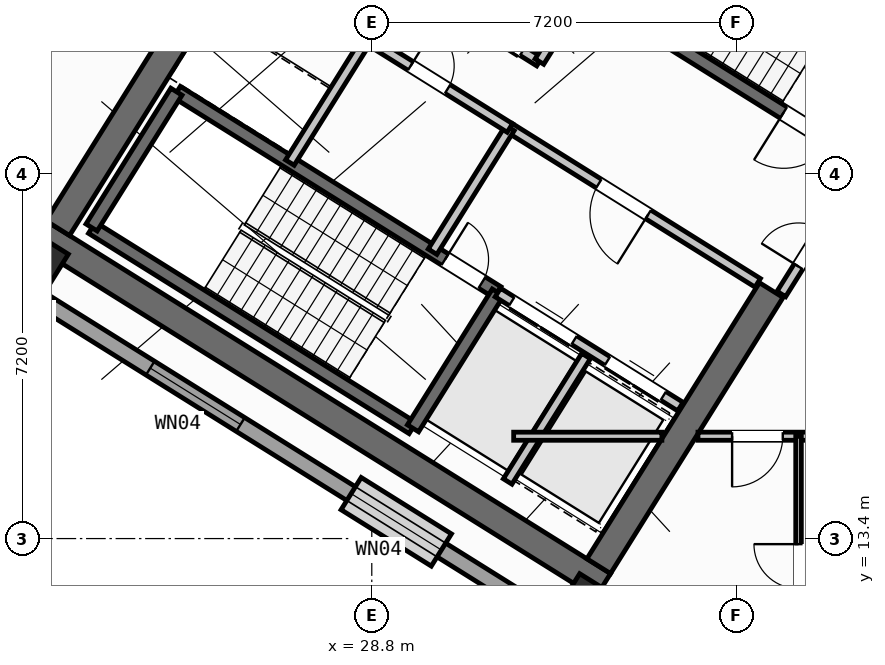
"""IFC4 building model, lengths in metres.
Left out: names, types, materials, properties, quantities, classifications, styles, units other than length and angle.
Written with IfcOpenShell. Run it as: python <this file> out.ifc"""

import sys

from ifc_helpers import new_model, si_unit, direction, frame, frame_2d, origin, origin_2d, place, context, subcontext, project, spatial, rectangle, hollow_rectangle, extrude, source, transform, mapped, element, fill, save


model = new_model("IFC4")
c1 = context("Model", 3, precision=1e-05, world=origin(), true_north=direction((0.0, 1.0)))
c2 = subcontext(c1, "Body", "Model", "MODEL_VIEW")
j1 = project(units=[si_unit("LENGTHUNIT", "METRE"), si_unit("PLANEANGLEUNIT", "RADIAN")], contexts=[c1])
p1 = place(None, origin())
s1 = spatial("IfcSite", under=j1, at=p1, CompositionType="ELEMENT")
p2 = place(p1, origin())
s2 = spatial("IfcBuilding", under=s1, at=p2, CompositionType="ELEMENT")
p3 = place(p2, frame((0.0, 0.0, 123.3)))
s3 = spatial("IfcBuildingStorey", under=s2, at=p3, CompositionType="ELEMENT", Elevation=123.3)
p4 = place(p3, frame((33.366, 12.477, 0.0), z_axis=(0.0, 0.0, 1.0), x_axis=(-0.848047359947, 0.529920442413, 0.0)))
e1 = element("IfcWall", 1, at=p4, inside=s3, PredefinedType="SHEAR", context=c2, shape_type="SweptSolid", body=[
    extrude(rectangle(XDim=13.14, YDim=0.55, at=frame_2d((6.57, 0.0))), origin(), (0.0, 0.0, 1.0), 4.22),
])
p5 = place(p3, frame((36.683, 18.304, 0.0), z_axis=(0.0, 0.0, 1.0), x_axis=(-0.529896466841, -0.848062341122, 0.0)))
e2 = element("IfcWall", 2, at=p5, inside=s3, PredefinedType="SHEAR", context=c2, shape_type="SweptSolid", body=[
    extrude(rectangle(XDim=6.425, YDim=0.55, at=frame_2d((3.212, 0.0))), origin(), (0.0, 0.0, 1.0), 4.22),
])
p6 = place(p3, frame((26.007, 24.976, 0.0), z_axis=(0.0, 0.0, 1.0), x_axis=(-0.529923795287, -0.848045264823, 0.0)))
e3 = element("IfcWall", 3, at=p6, inside=s3, PredefinedType="SHEAR", context=c2, shape_type="SweptSolid", body=[
    extrude(rectangle(XDim=6.425, YDim=0.55, at=frame_2d((3.212, 0.0))), origin(), (0.0, 0.0, 1.0), 4.22),
])
m1 = source(origin(), c2, "Body", "SweptSolid", [
    extrude(hollow_rectangle(XDim=0.9, YDim=0.9, WallThickness=0.036, at=origin_2d()), origin(), (0.0, 0.0, 1.0), 4.5),
])
for number, where, z_axis, x_axis in (
    (4, (33.046, 12.087, 0.0), (0.0, 0.0, 1.0), (-0.848, 0.53, 0.0)),
    (5, (22.191, 18.87, 0.0), (0.0, 0.0, 1.0), (-0.848, 0.53, 0.0)),
):
    element("IfcColumn", number, at=place(p3, frame(where, z_axis=z_axis, x_axis=x_axis)), inside=s3, PredefinedType="COLUMN", context=c2, shape_type="MappedRepresentation", body=[
        mapped(m1, transform((0.0, 0.0, 0.0), scale=1.0)),
    ])
p7 = place(p3, frame((31.76, 12.183, 0.0), z_axis=(0.0, 0.0, 1.0), x_axis=(-0.848047074256, 0.529920899612, 0.0)))
e6 = element("IfcWall", 6, at=p7, inside=s3, PredefinedType="STANDARD", context=c2, shape_type="SweptSolid", body=[
    extrude(rectangle(XDim=30.652, YDim=0.32, at=frame_2d((15.326, 0.0))), origin(), (0.0, 0.0, 1.0), 4.22),
])
p8 = place(p7, frame((14.966, 0.0, 0.0)))
e7 = element("IfcOpeningElement", 7, at=p8, cuts=e6, PredefinedType="OPENING", context=c2, shape_type="SweptSolid", body=[
    extrude(rectangle(XDim=1.2, YDim=2.15, at=frame_2d((0.6, 1.075))), frame((0.0, 0.17, 0.0), z_axis=(0.0, -1.0, 0.0), x_axis=(1.0, 0.0, 0.0)), (0.0, 0.0, 1.0), 0.34),
])
p9 = place(p7, frame((1.871, 0.0, 0.8)))
e8 = element("IfcOpeningElement", 8, at=p9, cuts=e6, PredefinedType="OPENING", context=c2, shape_type="SweptSolid", body=[
    extrude(rectangle(XDim=2.1, YDim=1.55, at=frame_2d((1.05, 0.775))), frame((0.0, 0.17, 0.0), z_axis=(0.0, -1.0, 0.0), x_axis=(1.0, 0.0, 0.0)), (0.0, 0.0, 1.0), 0.34),
])
p10 = place(p7, frame((6.546, 0.0, 0.8)))
e9 = element("IfcOpeningElement", 9, at=p10, cuts=e6, PredefinedType="OPENING", context=c2, shape_type="SweptSolid", body=[
    extrude(rectangle(XDim=2.1, YDim=1.55, at=frame_2d((1.05, 0.775))), frame((0.0, 0.17, 0.0), z_axis=(0.0, -1.0, 0.0), x_axis=(1.0, 0.0, 0.0)), (0.0, 0.0, 1.0), 0.34),
])
p11 = place(p7, frame((20.508, 0.0, 0.85)))
e10 = element("IfcOpeningElement", 10, at=p11, cuts=e6, PredefinedType="OPENING", context=c2, shape_type="SweptSolid", body=[
    extrude(rectangle(XDim=1.5, YDim=1.5, at=frame_2d((0.75, 0.75))), frame((0.0, 0.17, 0.0), z_axis=(0.0, -1.0, 0.0), x_axis=(1.0, 0.0, 0.0)), (0.0, 0.0, 1.0), 0.34),
])
p12 = place(p7, frame((27.253, 0.0, 0.95)))
e11 = element("IfcOpeningElement", 11, at=p12, cuts=e6, PredefinedType="OPENING", context=c2, shape_type="SweptSolid", body=[
    extrude(rectangle(XDim=1.2, YDim=1.4, at=frame_2d((0.6, 0.7))), frame((0.0, 0.17, 0.0), z_axis=(0.0, -1.0, 0.0), x_axis=(1.0, 0.0, 0.0)), (0.0, 0.0, 1.0), 0.34),
])
p13 = place(p3, frame((29.605, 15.581, 0.0), z_axis=(0.0, 0.0, 1.0), x_axis=(-0.848036911448, 0.529937163087, 0.0)))
e12 = element("IfcWall", 12, at=p13, inside=s3, PredefinedType="SHEAR", context=c2, shape_type="SweptSolid", body=[
    extrude(rectangle(XDim=7.46, YDim=0.26, at=frame_2d((3.73, 0.0))), origin(), (0.0, 0.0, 1.0), 4.22),
])
p14 = place(p3, frame((31.28, 18.261, 0.0), z_axis=(0.0, 0.0, 1.0), x_axis=(-0.848051618787, 0.529913626805, 0.0)))
e13 = element("IfcWall", 13, at=p14, inside=s3, PredefinedType="SHEAR", context=c2, shape_type="SweptSolid", body=[
    extrude(rectangle(XDim=7.46, YDim=0.26, at=frame_2d((3.73, 0.0))), origin(), (0.0, 0.0, 1.0), 4.22),
])
p15 = place(p14, frame((0.36, 0.0, 0.0)))
e14 = element("IfcOpeningElement", 14, at=p15, cuts=e13, PredefinedType="OPENING", context=c2, shape_type="SweptSolid", body=[
    extrude(rectangle(XDim=0.86, YDim=2.05, at=frame_2d((0.43, 1.025))), frame((0.0, 0.14, 0.0), z_axis=(0.0, -1.0, 0.0), x_axis=(1.0, 0.0, 0.0)), (0.0, 0.0, 1.0), 0.28),
])
p16 = place(p3, frame((31.288, 18.256, 0.0), z_axis=(0.0, 0.0, 1.0), x_axis=(-0.529943379326, -0.848033026897, 0.0)))
e15 = element("IfcWall", 15, at=p16, inside=s3, PredefinedType="SHEAR", context=c2, shape_type="SweptSolid", body=[
    extrude(rectangle(XDim=3.16, YDim=0.26, at=frame_2d((1.58, 0.0))), origin(), (0.0, 0.0, 1.0), 4.22),
])
p17 = place(p3, frame((24.945, 22.22, 0.0), z_axis=(0.0, 0.0, 1.0), x_axis=(-0.529908658664, -0.84805472316, 0.0)))
e16 = element("IfcWall", 16, at=p17, inside=s3, PredefinedType="SHEAR", context=c2, shape_type="SweptSolid", body=[
    extrude(rectangle(XDim=3.16, YDim=0.26, at=frame_2d((1.58, 0.0))), origin(), (0.0, 0.0, 1.0), 4.22),
])
p18 = place(p3, frame((38.046, 21.108, 0.0), z_axis=(0.0, 0.0, 1.0), x_axis=(-0.848054434086, 0.529909121291, 0.0)))
e17 = element("IfcWall", 17, at=p18, inside=s3, PredefinedType="SHEAR", context=c2, shape_type="SweptSolid", body=[
    extrude(rectangle(XDim=7.33, YDim=0.26, at=frame_2d((3.665, 0.0))), origin(), (0.0, 0.0, 1.0), 4.22),
])
p19 = place(p18, frame((0.22, 0.0, 0.0)))
e18 = element("IfcOpeningElement", 18, at=p19, cuts=e17, PredefinedType="OPENING", context=c2, shape_type="SweptSolid", body=[
    extrude(rectangle(XDim=1.1, YDim=2.1, at=frame_2d((0.55, 1.05))), frame((0.0, 0.14, 0.0), z_axis=(0.0, -1.0, 0.0), x_axis=(1.0, 0.0, 0.0)), (0.0, 0.0, 1.0), 0.28),
])
p20 = place(p3, frame((34.891, 16.005, 0.0), z_axis=(0.0, 0.0, 1.0), x_axis=(-0.848062873452, 0.529895614884, 0.0)))
e19 = element("IfcWall", 19, at=p20, inside=s3, PredefinedType="STANDARD", context=c2, shape_type="SweptSolid", body=[
    extrude(rectangle(XDim=4.248, YDim=0.2, at=frame_2d((2.124, 0.0))), origin(), (0.0, 0.0, 1.0), 4.21),
])
p21 = place(p20, frame((0.398, 0.0, 0.0)))
e20 = element("IfcOpeningElement", 20, at=p21, cuts=e19, PredefinedType="OPENING", context=c2, shape_type="SweptSolid", body=[
    extrude(rectangle(XDim=1.3, YDim=2.2, at=frame_2d((0.65, 1.1))), frame((0.0, 0.11, 0.0), z_axis=(0.0, -1.0, 0.0), x_axis=(1.0, 0.0, 0.0)), (0.0, 0.0, 1.0), 0.22),
])
p22 = place(p20, frame((2.473, 0.0, 0.0)))
e21 = element("IfcOpeningElement", 21, at=p22, cuts=e19, PredefinedType="OPENING", context=c2, shape_type="SweptSolid", body=[
    extrude(rectangle(XDim=1.45, YDim=2.25, at=frame_2d((0.725, 1.125))), frame((0.0, 0.11, 0.0), z_axis=(0.0, -1.0, 0.0), x_axis=(1.0, 0.0, 0.0)), (0.0, 0.0, 1.0), 0.22),
])
p23 = place(p3, frame((36.417, 18.447, 0.0), z_axis=(0.0, 0.0, 1.0), x_axis=(-0.848064879198, 0.529892404805, 0.0)))
e22 = element("IfcWall", 22, at=p23, inside=s3, PredefinedType="STANDARD", context=c2, shape_type="SweptSolid", body=[
    extrude(rectangle(XDim=5.768, YDim=0.2, at=frame_2d((2.884, 0.0))), origin(), (0.0, 0.0, 1.0), 4.21),
])
p24 = place(p23, frame((2.548, 0.0, 0.0)))
e23 = element("IfcOpeningElement", 23, at=p24, cuts=e22, PredefinedType="OPENING", context=c2, shape_type="SweptSolid", body=[
    extrude(rectangle(XDim=1.15, YDim=2.1, at=frame_2d((0.575, 1.05))), frame((0.0, 0.11, 0.0), z_axis=(0.0, -1.0, 0.0), x_axis=(1.0, 0.0, 0.0)), (0.0, 0.0, 1.0), 0.22),
])
p25 = place(p3, frame((32.108, 22.814, 0.0), z_axis=(0.0, 0.0, 1.0), x_axis=(-0.848042229521, 0.529928652696, 0.0)))
e24 = element("IfcWall", 24, at=p25, inside=s3, PredefinedType="STANDARD", context=c2, shape_type="SweptSolid", body=[
    extrude(rectangle(XDim=5.62, YDim=0.2, at=frame_2d((2.81, 0.0))), origin(), (0.0, 0.0, 1.0), 4.21),
])
p26 = place(p25, frame((0.39, 0.0, 0.0)))
e25 = element("IfcOpeningElement", 25, at=p26, cuts=e24, PredefinedType="OPENING", context=c2, shape_type="SweptSolid", body=[
    extrude(rectangle(XDim=1.1, YDim=2.15, at=frame_2d((0.55, 1.075))), frame((0.0, 0.11, 0.0), z_axis=(0.0, -1.0, 0.0), x_axis=(1.0, 0.0, 0.0)), (0.0, 0.0, 1.0), 0.22),
])
p27 = place(p25, frame((2.25, 0.0, 0.0)))
e26 = element("IfcOpeningElement", 26, at=p27, cuts=e24, PredefinedType="OPENING", context=c2, shape_type="SweptSolid", body=[
    extrude(rectangle(XDim=1.1, YDim=2.15, at=frame_2d((0.55, 1.075))), frame((0.0, 0.11, 0.0), z_axis=(0.0, -1.0, 0.0), x_axis=(1.0, 0.0, 0.0)), (0.0, 0.0, 1.0), 0.22),
])
p28 = place(p25, frame((4.11, 0.0, 0.0)))
e27 = element("IfcOpeningElement", 27, at=p28, cuts=e24, PredefinedType="OPENING", context=c2, shape_type="SweptSolid", body=[
    extrude(rectangle(XDim=1.1, YDim=2.15, at=frame_2d((0.55, 1.075))), frame((0.0, 0.11, 0.0), z_axis=(0.0, -1.0, 0.0), x_axis=(1.0, 0.0, 0.0)), (0.0, 0.0, 1.0), 0.22),
])
p29 = place(p3, frame((32.982, 24.213, 0.0), z_axis=(0.0, 0.0, 1.0), x_axis=(-0.529839334948, -0.84809803628, 0.0)))
e28 = element("IfcWall", 28, at=p29, inside=s3, PredefinedType="STANDARD", context=c2, shape_type="SweptSolid", body=[
    extrude(rectangle(XDim=1.65, YDim=0.2, at=frame_2d((0.825, 0.0))), origin(), (0.0, 0.0, 1.0), 4.21),
])
p30 = place(p3, frame((33.029, 17.003, 0.0), z_axis=(0.0, 0.0, 1.0), x_axis=(-0.529916267533, -0.848049968695, 0.0)))
e29 = element("IfcWall", 29, at=p30, inside=s3, PredefinedType="STANDARD", context=c2, shape_type="SweptSolid", body=[
    extrude(rectangle(XDim=2.92, YDim=0.2, at=frame_2d((1.46, 0.0))), origin(), (0.0, 0.0, 1.0), 4.21),
])
for number, where, z_axis, x_axis in (
    (30, (31.525, 21.504, 0.0), (0.0, 0.0, 1.0), (-0.53, -0.848, 0.0)),
    (31, (28.71, 23.263, 0.0), (0.0, 0.0, 1.0), (-0.53, -0.848, 0.0)),
):
    element("IfcWall", number, at=place(p3, frame(where, z_axis=z_axis, x_axis=x_axis)), inside=s3, PredefinedType="STANDARD", context=c2, shape_type="SweptSolid", body=[
        extrude(rectangle(XDim=2.88, YDim=0.2, at=frame_2d((1.44, 0.0))), origin(), (0.0, 0.0, 1.0), 4.21),
    ])
p31 = place(p3, frame((31.525, 21.504, 0.0), z_axis=(0.0, 0.0, 1.0), x_axis=(-0.848040211232, 0.529931882541, 0.0)))
e32 = element("IfcWall", 32, at=p31, inside=s3, PredefinedType="STANDARD", context=c2, shape_type="SweptSolid", body=[
    extrude(rectangle(XDim=6.218, YDim=0.2, at=frame_2d((3.109, 0.0))), origin(), (0.0, 0.0, 1.0), 4.21),
])
p32 = place(p31, frame((4.4, 0.0, 0.0)))
e33 = element("IfcOpeningElement", 33, at=p32, cuts=e32, PredefinedType="OPENING", context=c2, shape_type="SweptSolid", body=[
    extrude(rectangle(XDim=0.86, YDim=2.05, at=frame_2d((0.43, 1.025))), frame((0.0, 0.11, 0.0), z_axis=(0.0, -1.0, 0.0), x_axis=(1.0, 0.0, 0.0)), (0.0, 0.0, 1.0), 0.22),
])
p33 = place(p31, frame((1.45, 0.0, 0.0)))
e34 = element("IfcOpeningElement", 34, at=p33, cuts=e32, PredefinedType="OPENING", context=c2, shape_type="SweptSolid", body=[
    extrude(rectangle(XDim=0.86, YDim=2.05, at=frame_2d((0.43, 1.025))), frame((0.0, 0.11, 0.0), z_axis=(0.0, -1.0, 0.0), x_axis=(1.0, 0.0, 0.0)), (0.0, 0.0, 1.0), 0.22),
])
p34 = place(p3, frame((25.198, 28.606, 0.0), z_axis=(0.0, 0.0, 1.0), x_axis=(-0.529926497642, -0.848043576178, 0.0)))
e35 = element("IfcWall", 35, at=p34, inside=s3, PredefinedType="PARTITIONING", context=c2, shape_type="SweptSolid", body=[
    extrude(rectangle(XDim=10.3, YDim=0.16, at=frame_2d((5.15, 0.0))), origin(), (0.0, 0.0, 1.0), 4.21),
])
p35 = place(p3, frame((38.451, 20.737, 0.0), z_axis=(0.0, 0.0, 1.0), x_axis=(-0.529924799939, -0.848044637038, 0.0)))
e36 = element("IfcWall", 36, at=p35, inside=s3, PredefinedType="STANDARD", context=c2, shape_type="SweptSolid", body=[
    extrude(rectangle(XDim=2.96, YDim=0.2, at=frame_2d((1.48, 0.0))), origin(), (0.0, 0.0, 1.0), 2.395),
])
p36 = place(p35, frame((1.46, 0.0, 0.0)))
e37 = element("IfcOpeningElement", 37, at=p36, cuts=e36, PredefinedType="OPENING", context=c2, shape_type="SweptSolid", body=[
    extrude(rectangle(XDim=0.86, YDim=2.05, at=frame_2d((0.43, 1.025))), frame((0.0, 0.11, 0.0), z_axis=(0.0, -1.0, 0.0), x_axis=(1.0, 0.0, 0.0)), (0.0, 0.0, 1.0), 0.22),
])
p37 = place(p3, frame((31.6, 15.42, 0.0), z_axis=(0.0, 0.0, 1.0), x_axis=(1.0, 0.0, 0.0)))
e38 = element("IfcWall", 38, at=p37, inside=s3, PredefinedType="PARTITIONING", context=c2, shape_type="SweptSolid", body=[
    extrude(rectangle(XDim=2.925, YDim=0.16, at=frame_2d((1.462, 0.0))), origin(), (0.0, 0.0, 1.0), 4.21),
])
p38 = place(p3, frame((35.237, 15.42, 0.0), z_axis=(0.0, 0.0, 1.0), x_axis=(1.0, 0.0, 0.0)))
e39 = element("IfcWall", 39, at=p38, inside=s3, PredefinedType="PARTITIONING", context=c2, shape_type="SweptSolid", body=[
    extrude(rectangle(XDim=15.432, YDim=0.16, at=frame_2d((7.716, 0.0))), origin(), (0.0, 0.0, 1.0), 4.21),
])
p39 = place(p38, frame((0.674, 0.0, 0.0)))
e40 = element("IfcOpeningElement", 40, at=p39, cuts=e39, PredefinedType="OPENING", context=c2, shape_type="SweptSolid", body=[
    extrude(rectangle(XDim=1.0, YDim=2.1, at=frame_2d((0.5, 1.05))), frame((0.0, 0.09, 0.0), z_axis=(0.0, -1.0, 0.0), x_axis=(1.0, 0.0, 0.0)), (0.0, 0.0, 1.0), 0.18),
])
p40 = place(p38, frame((9.094, 0.0, 0.0)))
e41 = element("IfcOpeningElement", 41, at=p40, cuts=e39, PredefinedType="OPENING", context=c2, shape_type="SweptSolid", body=[
    extrude(rectangle(XDim=1.0, YDim=2.1, at=frame_2d((0.5, 1.05))), frame((0.0, 0.09, 0.0), z_axis=(0.0, -1.0, 0.0), x_axis=(1.0, 0.0, 0.0)), (0.0, 0.0, 1.0), 0.18),
])
p41 = place(p3, frame((37.222, 1.96, 0.0), z_axis=(0.0, 0.0, 1.0), x_axis=(0.0, 1.0, 0.0)))
e42 = element("IfcWall", 42, at=p41, inside=s3, PredefinedType="PARTITIONING", context=c2, shape_type="SweptSolid", body=[
    extrude(rectangle(XDim=13.46, YDim=0.11, at=frame_2d((6.73, 0.0))), origin(), (0.0, 0.0, 1.0), 4.21),
])
p42 = place(p41, frame((5.2, 0.0, 0.0)))
e43 = element("IfcOpeningElement", 43, at=p42, cuts=e42, PredefinedType="OPENING", context=c2, shape_type="SweptSolid", body=[
    extrude(rectangle(XDim=0.92, YDim=2.08, at=frame_2d((0.46, 1.04))), frame((0.0, 0.065, 0.0), z_axis=(0.0, -1.0, 0.0), x_axis=(1.0, 0.0, 0.0)), (0.0, 0.0, 1.0), 0.13),
])
p43 = place(p41, frame((10.45, 0.0, 0.0)))
e44 = element("IfcOpeningElement", 44, at=p43, cuts=e42, PredefinedType="OPENING", context=c2, shape_type="SweptSolid", body=[
    extrude(rectangle(XDim=0.88, YDim=2.08, at=frame_2d((0.44, 1.04))), frame((0.0, 0.065, 0.0), z_axis=(0.0, -1.0, 0.0), x_axis=(1.0, 0.0, 0.0)), (0.0, 0.0, 1.0), 0.13),
])
m2 = source(origin(), c2, "Body", "SweptSolid", [
    extrude(rectangle(XDim=2.1, YDim=1.55, at=frame_2d((1.05, 0.775))), frame((0.0, 0.03, 0.0), z_axis=(0.0, -1.0, 0.0), x_axis=(1.0, 0.0, 0.0)), (0.0, 0.0, 1.0), 0.06),
])
p44 = place(p9, origin())
e45 = element("IfcWindow", 45, at=p44, inside=s3, PartitioningType="SINGLE_PANEL", PredefinedType="WINDOW", context=c2, shape_type="MappedRepresentation", body=[
    mapped(m2, transform((0.0, 0.0, 0.0), scale=1.0)),
])
fill(e8, e45)
p45 = place(p10, origin())
e46 = element("IfcWindow", 46, at=p45, inside=s3, PartitioningType="SINGLE_PANEL", PredefinedType="WINDOW", context=c2, shape_type="MappedRepresentation", body=[
    mapped(m2, transform((0.0, 0.0, 0.0), scale=1.0)),
])
fill(e9, e46)
m3 = source(origin(), c2, "Body", "SweptSolid", [
    extrude(rectangle(XDim=0.86, YDim=2.05, at=frame_2d((0.43, 1.025))), frame((0.0, 0.025, 0.0), z_axis=(0.0, -1.0, 0.0), x_axis=(1.0, 0.0, 0.0)), (0.0, 0.0, 1.0), 0.05),
])
p46 = place(p15, frame((0.86, 0.0, 0.0), z_axis=(0.0, 0.0, 1.0), x_axis=(-1.0, 0.0, 0.0)))
e47 = element("IfcDoor", 47, at=p46, inside=s3, OperationType="SINGLE_SWING_LEFT", PredefinedType="DOOR", context=c2, shape_type="MappedRepresentation", body=[
    mapped(m3, transform((0.0, 0.0, 0.0), scale=1.0)),
])
fill(e14, e47)
m4 = source(origin(), c2, "Body", "SweptSolid", [
    extrude(rectangle(XDim=1.1, YDim=2.1, at=frame_2d((0.55, 1.05))), frame((0.0, 0.025, 0.0), z_axis=(0.0, -1.0, 0.0), x_axis=(1.0, 0.0, 0.0)), (0.0, 0.0, 1.0), 0.05),
])
p47 = place(p19, origin())
e48 = element("IfcDoor", 48, at=p47, inside=s3, OperationType="SINGLE_SWING_RIGHT", PredefinedType="DOOR", context=c2, shape_type="MappedRepresentation", body=[
    mapped(m4, transform((0.0, 0.0, 0.0), scale=1.0)),
])
fill(e18, e48)
m5 = source(origin(), c2, "Body", "SweptSolid", [
    extrude(rectangle(XDim=1.15, YDim=2.1, at=frame_2d((0.575, 1.05))), frame((0.0, 0.025, 0.0), z_axis=(0.0, -1.0, 0.0), x_axis=(1.0, 0.0, 0.0)), (0.0, 0.0, 1.0), 0.05),
])
p48 = place(p24, origin())
e49 = element("IfcDoor", 49, at=p48, inside=s3, OperationType="SINGLE_SWING_LEFT", PredefinedType="DOOR", context=c2, shape_type="MappedRepresentation", body=[
    mapped(m5, transform((0.0, 0.0, 0.0), scale=1.0)),
])
fill(e23, e49)
m6 = source(origin(), c2, "Body", "SweptSolid", [
    extrude(rectangle(XDim=1.3, YDim=2.2, at=frame_2d((0.65, 1.1))), frame((0.0, 0.025, 0.0), z_axis=(0.0, -1.0, 0.0), x_axis=(1.0, 0.0, 0.0)), (0.0, 0.0, 1.0), 0.05),
])
p49 = place(p21, origin())
e50 = element("IfcDoor", 50, at=p49, inside=s3, OperationType="DOUBLE_DOOR_SLIDING", PredefinedType="DOOR", context=c2, shape_type="MappedRepresentation", body=[
    mapped(m6, transform((0.0, 0.0, 0.0), scale=1.0)),
])
fill(e20, e50)
m7 = source(origin(), c2, "Body", "SweptSolid", [
    extrude(rectangle(XDim=1.45, YDim=2.25, at=frame_2d((0.725, 1.125))), frame((0.0, 0.025, 0.0), z_axis=(0.0, -1.0, 0.0), x_axis=(1.0, 0.0, 0.0)), (0.0, 0.0, 1.0), 0.05),
])
p50 = place(p22, origin())
e51 = element("IfcDoor", 51, at=p50, inside=s3, OperationType="DOUBLE_DOOR_SLIDING", PredefinedType="DOOR", context=c2, shape_type="MappedRepresentation", body=[
    mapped(m7, transform((0.0, 0.0, 0.0), scale=1.0)),
])
fill(e21, e51)
p51 = place(p33, frame((0.86, 0.0, 0.0), z_axis=(0.0, 0.0, 1.0), x_axis=(-1.0, 0.0, 0.0)))
e52 = element("IfcDoor", 52, at=p51, inside=s3, OperationType="SINGLE_SWING_LEFT", PredefinedType="DOOR", context=c2, shape_type="MappedRepresentation", body=[
    mapped(m3, transform((0.0, 0.0, 0.0), scale=1.0)),
])
fill(e34, e52)
p52 = place(p36, frame((0.86, 0.0, 0.0), z_axis=(0.0, 0.0, 1.0), x_axis=(-1.0, 0.0, 0.0)))
e53 = element("IfcDoor", 53, at=p52, inside=s3, OperationType="SINGLE_SWING_LEFT", PredefinedType="DOOR", context=c2, shape_type="MappedRepresentation", body=[
    mapped(m3, transform((0.0, 0.0, 0.0), scale=1.0)),
])
fill(e37, e53)
m8 = source(origin(), c2, "Body", "SweptSolid", [
    extrude(rectangle(XDim=1.0, YDim=2.1, at=frame_2d((0.5, 1.05))), frame((0.0, 0.025, 0.0), z_axis=(0.0, -1.0, 0.0), x_axis=(1.0, 0.0, 0.0)), (0.0, 0.0, 1.0), 0.05),
])
p53 = place(p39, frame((1.0, 0.0, 0.0), z_axis=(0.0, 0.0, 1.0), x_axis=(-1.0, 0.0, 0.0)))
e54 = element("IfcDoor", 54, at=p53, inside=s3, OperationType="SINGLE_SWING_RIGHT", PredefinedType="DOOR", context=c2, shape_type="MappedRepresentation", body=[
    mapped(m8, transform((0.0, 0.0, 0.0), scale=1.0)),
])
fill(e40, e54)
m9 = source(origin(), c2, "Body", "SweptSolid", [
    extrude(rectangle(XDim=0.88, YDim=2.08, at=frame_2d((0.44, 1.04))), frame((0.0, 0.025, 0.0), z_axis=(0.0, -1.0, 0.0), x_axis=(1.0, 0.0, 0.0)), (0.0, 0.0, 1.0), 0.05),
])
p54 = place(p43, origin())
e55 = element("IfcDoor", 55, at=p54, inside=s3, OperationType="SINGLE_SWING_RIGHT", PredefinedType="DOOR", context=c2, shape_type="MappedRepresentation", body=[
    mapped(m9, transform((0.0, 0.0, 0.0), scale=1.0)),
])
fill(e44, e55)
save(model, sys.argv[1])
